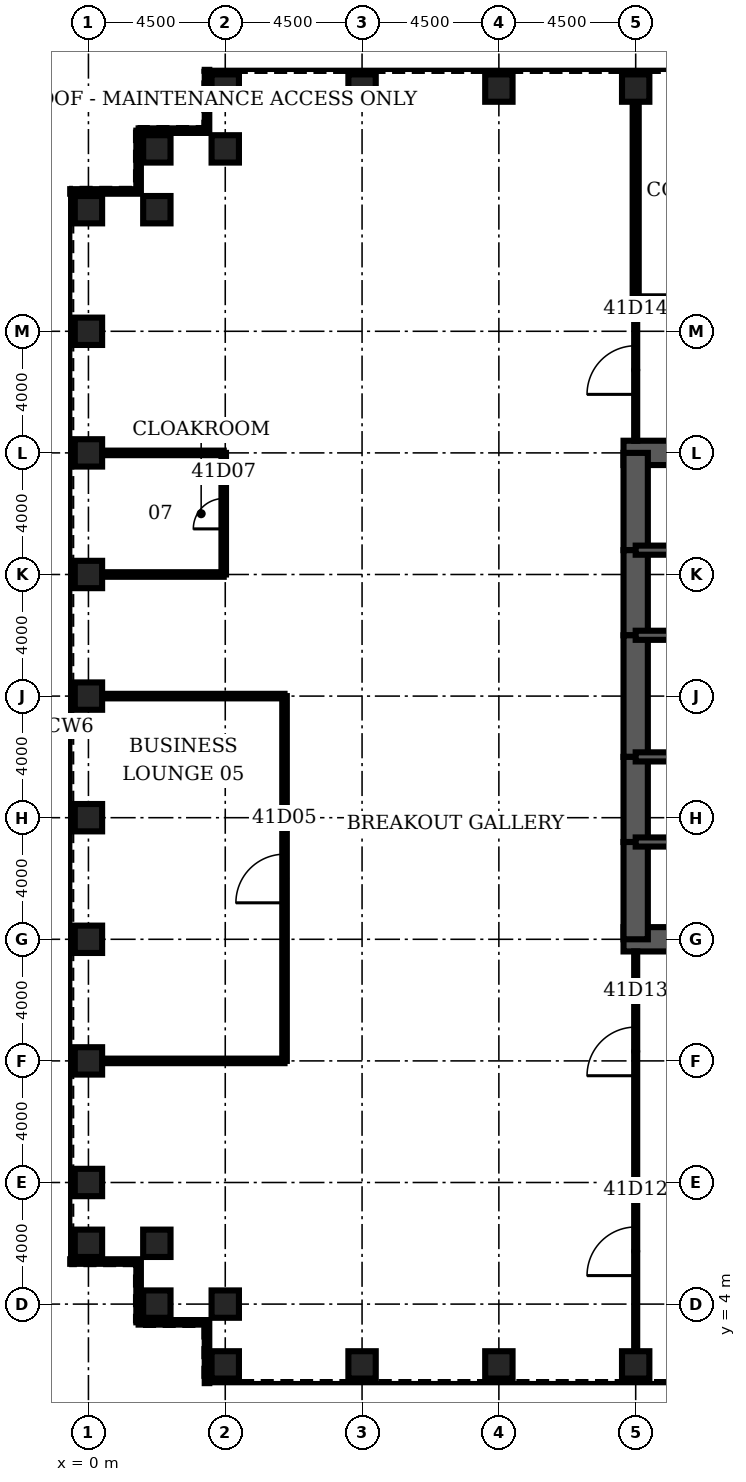
"""IFC4 building model, lengths in metres.
Left out: names, types, materials, properties, quantities, classifications, styles, units other than length and angle.
Written with IfcOpenShell. Run it as: python <this file> out.ifc"""

import sys

from ifc_helpers import new_model, si_unit, direction, frame, frame_2d, origin, origin_2d, place, context, subcontext, project, spatial, rectangle, hollow_rectangle, extrude, element, fill, save


model = new_model("IFC4")
c1 = context("Model", 3, precision=1e-05, world=origin(), true_north=direction((0.0, 1.0)))
c2 = subcontext(c1, "Body", "Model", "MODEL_VIEW")
j1 = project(units=[si_unit("LENGTHUNIT", "METRE"), si_unit("PLANEANGLEUNIT", "RADIAN")], contexts=[c1])
p1 = place(None, origin())
s1 = spatial("IfcSite", under=j1, at=p1, CompositionType="ELEMENT")
p2 = place(p1, origin())
s2 = spatial("IfcBuilding", under=s1, at=p2, CompositionType="ELEMENT")
p3 = place(p2, frame((0.0, 0.0, 185.8)))
s3 = spatial("IfcBuildingStorey", under=s2, at=p3, CompositionType="ELEMENT", Elevation=185.8)
for number, where, z_axis, x_axis in (
    (1, (4.5, 2.0, 0.0), (0.0, 0.0, 1.0), (0.0, 1.0, 0.0)),
    (2, (9.0, 2.0, 0.0), (0.0, 0.0, 1.0), (0.0, 1.0, 0.0)),
    (3, (13.5, 2.0, 0.0), (0.0, 0.0, 1.0), (0.0, 1.0, 0.0)),
    (4, (18.0, 2.0, 0.0), (0.0, 0.0, 1.0), (0.0, 1.0, 0.0)),
    (5, (18.0, 44.0, 0.0), (0.0, 0.0, 1.0), (0.0, 1.0, 0.0)),
    (6, (13.5, 44.0, 0.0), (0.0, 0.0, 1.0), (0.0, 1.0, 0.0)),
    (7, (9.0, 44.0, 0.0), (0.0, 0.0, 1.0), (0.0, 1.0, 0.0)),
    (8, (4.5, 44.0, 0.0), (0.0, 0.0, 1.0), (0.0, 1.0, 0.0)),
    (9, (4.5, 42.0, 0.0), (0.0, 0.0, 1.0), (0.0, 1.0, 0.0)),
    (10, (2.25, 42.0, 0.0), (0.0, 0.0, 1.0), (1.0, 0.0, 0.0)),
    (11, (2.25, 40.0, 0.0), (0.0, 0.0, 1.0), (1.0, 0.0, 0.0)),
    (12, (0.0, 40.0, 0.0), (0.0, 0.0, 1.0), (1.0, 0.0, 0.0)),
    (13, (0.0, 36.0, 0.0), (0.0, 0.0, 1.0), (1.0, 0.0, 0.0)),
    (14, (0.0, 32.0, 0.0), (0.0, 0.0, 1.0), (1.0, 0.0, 0.0)),
    (15, (0.0, 28.0, 0.0), (0.0, 0.0, 1.0), (1.0, 0.0, 0.0)),
    (16, (0.0, 24.0, 0.0), (0.0, 0.0, 1.0), (1.0, 0.0, 0.0)),
    (17, (0.0, 20.0, 0.0), (0.0, 0.0, 1.0), (1.0, 0.0, 0.0)),
    (18, (0.0, 16.0, 0.0), (0.0, 0.0, 1.0), (1.0, 0.0, 0.0)),
    (19, (0.0, 12.0, 0.0), (0.0, 0.0, 1.0), (1.0, 0.0, 0.0)),
    (20, (0.0, 8.0, 0.0), (0.0, 0.0, 1.0), (1.0, 0.0, 0.0)),
    (21, (0.0, 6.0, 0.0), (0.0, 0.0, 1.0), (1.0, 0.0, 0.0)),
    (22, (2.25, 6.0, 0.0), (0.0, 0.0, 1.0), (1.0, 0.0, 0.0)),
    (23, (2.25, 4.0, 0.0), (0.0, 0.0, 1.0), (1.0, 0.0, 0.0)),
    (24, (4.5, 4.0, 0.0), (0.0, 0.0, 1.0), (0.0, 1.0, 0.0)),
):
    element("IfcColumn", number, at=place(p3, frame(where, z_axis=z_axis, x_axis=x_axis)), inside=s3, PredefinedType="COLUMN", context=c2, shape_type="SweptSolid", body=[
        extrude(hollow_rectangle(XDim=0.9, YDim=0.9, WallThickness=0.09, at=origin_2d()), origin(), (0.0, 0.0, 1.0), 4.2),
    ])
for number, where, z_axis, x_axis in (
    (25, (17.6, 16.0, 0.0), (0.0, 0.0, 1.0), (1.0, 0.0, 0.0)),
    (26, (27.0, 32.0, 0.0), (0.0, 0.0, 1.0), (-1.0, 0.0, 0.0)),
):
    element("IfcWall", number, at=place(p3, frame(where, z_axis=z_axis, x_axis=x_axis)), inside=s3, PredefinedType="SHEAR", context=c2, shape_type="SweptSolid", body=[
        extrude(rectangle(XDim=9.4, YDim=0.8, at=frame_2d((4.7, 0.0))), origin(), (0.0, 0.0, 1.0), 4.2),
    ])
p4 = place(p3, frame((18.0, 32.0, 0.0), z_axis=(0.0, 0.0, 1.0), x_axis=(0.0, -1.0, 0.0)))
e27 = element("IfcWall", 27, at=p4, inside=s3, PredefinedType="SHEAR", context=c2, shape_type="SweptSolid", body=[
    extrude(rectangle(XDim=3.2, YDim=0.8, at=frame_2d((1.6, 0.0))), origin(), (0.0, 0.0, 1.0), 4.2),
])
p5 = place(p3, frame((18.0, 28.8, 0.0), z_axis=(0.0, 0.0, 1.0), x_axis=(0.0, -1.0, 0.0)))
e28 = element("IfcWall", 28, at=p5, inside=s3, PredefinedType="SHEAR", context=c2, shape_type="SweptSolid", body=[
    extrude(rectangle(XDim=2.8, YDim=0.8, at=frame_2d((1.4, 0.0))), origin(), (0.0, 0.0, 1.0), 4.2),
])
p6 = place(p5, frame((0.4, 0.0, 0.0)))
e29 = element("IfcOpeningElement", 29, at=p6, cuts=e28, PredefinedType="OPENING", context=c2, shape_type="SweptSolid", body=[
    extrude(rectangle(XDim=1.8, YDim=2.1, at=frame_2d((0.9, 1.05))), frame((0.0, 0.41, 0.0), z_axis=(0.0, -1.0, 0.0), x_axis=(1.0, 0.0, 0.0)), (0.0, 0.0, 1.0), 0.82),
])
p7 = place(p3, frame((18.0, 26.0, 0.0), z_axis=(0.0, 0.0, 1.0), x_axis=(0.0, -1.0, 0.0)))
e30 = element("IfcWall", 30, at=p7, inside=s3, PredefinedType="SHEAR", context=c2, shape_type="SweptSolid", body=[
    extrude(rectangle(XDim=4.0, YDim=0.8, at=frame_2d((2.0, 0.0))), origin(), (0.0, 0.0, 1.0), 4.2),
])
p8 = place(p3, frame((18.0, 22.0, 0.0), z_axis=(0.0, 0.0, 1.0), x_axis=(0.0, -1.0, 0.0)))
e31 = element("IfcWall", 31, at=p8, inside=s3, PredefinedType="SHEAR", context=c2, shape_type="SweptSolid", body=[
    extrude(rectangle(XDim=2.8, YDim=0.8, at=frame_2d((1.4, 0.0))), origin(), (0.0, 0.0, 1.0), 4.2),
])
p9 = place(p8, frame((0.6, 0.0, 0.0)))
e32 = element("IfcOpeningElement", 32, at=p9, cuts=e31, PredefinedType="OPENING", context=c2, shape_type="SweptSolid", body=[
    extrude(rectangle(XDim=1.8, YDim=2.1, at=frame_2d((0.9, 1.05))), frame((0.0, 0.41, 0.0), z_axis=(0.0, -1.0, 0.0), x_axis=(1.0, 0.0, 0.0)), (0.0, 0.0, 1.0), 0.82),
])
p10 = place(p3, frame((18.0, 19.2, 0.0), z_axis=(0.0, 0.0, 1.0), x_axis=(0.0, -1.0, 0.0)))
e33 = element("IfcWall", 33, at=p10, inside=s3, PredefinedType="SHEAR", context=c2, shape_type="SweptSolid", body=[
    extrude(rectangle(XDim=3.2, YDim=0.8, at=frame_2d((1.6, 0.0))), origin(), (0.0, 0.0, 1.0), 4.2),
])
p11 = place(p3, frame((18.0, 19.2, 0.0), z_axis=(0.0, 0.0, 1.0), x_axis=(1.0, 0.0, 0.0)))
e34 = element("IfcWall", 34, at=p11, inside=s3, PredefinedType="SOLIDWALL", context=c2, shape_type="SweptSolid", body=[
    extrude(rectangle(XDim=9.0, YDim=0.3, at=frame_2d((4.5, 0.0))), origin(), (0.0, 0.0, 1.0), 4.2),
])
p12 = place(p11, frame((0.65, 0.0, 0.0)))
e35 = element("IfcOpeningElement", 35, at=p12, cuts=e34, PredefinedType="OPENING", context=c2, shape_type="SweptSolid", body=[
    extrude(rectangle(XDim=1.0, YDim=2.1, at=frame_2d((0.5, 1.05))), frame((0.0, 0.16, 0.0), z_axis=(0.0, -1.0, 0.0), x_axis=(1.0, 0.0, 0.0)), (0.0, 0.0, 1.0), 0.32),
])
p13 = place(p3, frame((18.0, 28.8, 0.0), z_axis=(0.0, 0.0, 1.0), x_axis=(1.0, 0.0, 0.0)))
e36 = element("IfcWall", 36, at=p13, inside=s3, PredefinedType="SOLIDWALL", context=c2, shape_type="SweptSolid", body=[
    extrude(rectangle(XDim=9.0, YDim=0.3, at=frame_2d((4.5, 0.0))), origin(), (0.0, 0.0, 1.0), 4.2),
])
p14 = place(p13, frame((0.65, 0.0, 0.0)))
e37 = element("IfcOpeningElement", 37, at=p14, cuts=e36, PredefinedType="OPENING", context=c2, shape_type="SweptSolid", body=[
    extrude(rectangle(XDim=1.0, YDim=2.1, at=frame_2d((0.5, 1.05))), frame((0.0, 0.16, 0.0), z_axis=(0.0, -1.0, 0.0), x_axis=(1.0, 0.0, 0.0)), (0.0, 0.0, 1.0), 0.32),
])
p15 = place(p3, frame((18.0, 22.0, 0.0), z_axis=(0.0, 0.0, 1.0), x_axis=(1.0, 0.0, 0.0)))
e38 = element("IfcWall", 38, at=p15, inside=s3, PredefinedType="SOLIDWALL", context=c2, shape_type="SweptSolid", body=[
    extrude(rectangle(XDim=6.0, YDim=0.3, at=frame_2d((3.0, 0.0))), origin(), (0.0, 0.0, 1.0), 4.2),
])
p16 = place(p15, frame((2.0, 0.0, 0.0)))
e39 = element("IfcOpeningElement", 39, at=p16, cuts=e38, PredefinedType="OPENING", context=c2, shape_type="SweptSolid", body=[
    extrude(rectangle(XDim=1.0, YDim=2.1, at=frame_2d((0.5, 1.05))), frame((0.0, 0.16, 0.0), z_axis=(0.0, -1.0, 0.0), x_axis=(1.0, 0.0, 0.0)), (0.0, 0.0, 1.0), 0.32),
])
p17 = place(p3, frame((18.0, 26.0, 0.0), z_axis=(0.0, 0.0, 1.0), x_axis=(1.0, 0.0, 0.0)))
e40 = element("IfcWall", 40, at=p17, inside=s3, PredefinedType="SOLIDWALL", context=c2, shape_type="SweptSolid", body=[
    extrude(rectangle(XDim=6.0, YDim=0.3, at=frame_2d((3.0, 0.0))), origin(), (0.0, 0.0, 1.0), 4.2),
])
for number, where, z_axis, x_axis in (
    (41, (0.45, 12.0, 0.0), (0.0, 0.0, 1.0), (1.0, 0.0, 0.0)),
    (42, (0.45, 24.0, 0.0), (0.0, 0.0, 1.0), (1.0, 0.0, 0.0)),
):
    element("IfcWall", number, at=place(p3, frame(where, z_axis=z_axis, x_axis=x_axis)), inside=s3, PredefinedType="PARTITIONING", context=c2, shape_type="SweptSolid", body=[
        extrude(rectangle(XDim=6.0, YDim=0.15, at=frame_2d((3.0, 0.0))), origin(), (0.0, 0.0, 1.0), 3.0),
    ])
for number, where, z_axis, x_axis in (
    (43, (0.45, 28.0, 0.0), (0.0, 0.0, 1.0), (1.0, 0.0, 0.0)),
    (44, (0.45, 32.0, 0.0), (0.0, 0.0, 1.0), (1.0, 0.0, 0.0)),
):
    element("IfcWall", number, at=place(p3, frame(where, z_axis=z_axis, x_axis=x_axis)), inside=s3, PredefinedType="PARTITIONING", context=c2, shape_type="SweptSolid", body=[
        extrude(rectangle(XDim=4.0, YDim=0.15, at=frame_2d((2.0, 0.0))), origin(), (0.0, 0.0, 1.0), 3.0),
    ])
p18 = place(p3, frame((18.0, 37.05, 0.0), z_axis=(0.0, 0.0, 1.0), x_axis=(1.0, 0.0, 0.0)))
e45 = element("IfcWall", 45, at=p18, inside=s3, PredefinedType="PARTITIONING", context=c2, shape_type="SweptSolid", body=[
    extrude(rectangle(XDim=27.0, YDim=0.2, at=frame_2d((13.5, 0.0))), origin(), (0.0, 0.0, 1.0), 3.0),
])
p19 = place(p18, frame((3.7, 0.0, 0.0)))
e46 = element("IfcOpeningElement", 46, at=p19, cuts=e45, PredefinedType="OPENING", context=c2, shape_type="SweptSolid", body=[
    extrude(rectangle(XDim=1.6, YDim=2.1, at=frame_2d((0.8, 1.05))), frame((0.0, 0.11, 0.0), z_axis=(0.0, -1.0, 0.0), x_axis=(1.0, 0.0, 0.0)), (0.0, 0.0, 1.0), 0.22),
])
p20 = place(p18, frame((12.7, 0.0, 0.0)))
e47 = element("IfcOpeningElement", 47, at=p20, cuts=e45, PredefinedType="OPENING", context=c2, shape_type="SweptSolid", body=[
    extrude(rectangle(XDim=1.6, YDim=2.1, at=frame_2d((0.8, 1.05))), frame((0.0, 0.11, 0.0), z_axis=(0.0, -1.0, 0.0), x_axis=(1.0, 0.0, 0.0)), (0.0, 0.0, 1.0), 0.22),
])
p21 = place(p18, frame((21.7, 0.0, 0.0)))
e48 = element("IfcOpeningElement", 48, at=p21, cuts=e45, PredefinedType="OPENING", context=c2, shape_type="SweptSolid", body=[
    extrude(rectangle(XDim=1.6, YDim=2.1, at=frame_2d((0.8, 1.05))), frame((0.0, 0.11, 0.0), z_axis=(0.0, -1.0, 0.0), x_axis=(1.0, 0.0, 0.0)), (0.0, 0.0, 1.0), 0.22),
])
p22 = place(p3, frame((4.45, 28.0, 0.0), z_axis=(0.0, 0.0, 1.0), x_axis=(0.0, 1.0, 0.0)))
e49 = element("IfcWall", 49, at=p22, inside=s3, PredefinedType="PARTITIONING", context=c2, shape_type="SweptSolid", body=[
    extrude(rectangle(XDim=4.0, YDim=0.15, at=frame_2d((2.0, 0.0))), origin(), (0.0, 0.0, 1.0), 3.0),
])
p23 = place(p22, frame((1.5, 0.0, 0.0)))
e50 = element("IfcOpeningElement", 50, at=p23, cuts=e49, PredefinedType="OPENING", context=c2, shape_type="SweptSolid", body=[
    extrude(rectangle(XDim=1.0, YDim=2.1, at=frame_2d((0.5, 1.05))), frame((0.0, 0.085, 0.0), z_axis=(0.0, -1.0, 0.0), x_axis=(1.0, 0.0, 0.0)), (0.0, 0.0, 1.0), 0.17),
])
p24 = place(p3, frame((6.45, 12.0, 0.0), z_axis=(0.0, 0.0, 1.0), x_axis=(0.0, 1.0, 0.0)))
e51 = element("IfcWall", 51, at=p24, inside=s3, PredefinedType="PARTITIONING", context=c2, shape_type="SweptSolid", body=[
    extrude(rectangle(XDim=12.0, YDim=0.15, at=frame_2d((6.0, 0.0))), origin(), (0.0, 0.0, 1.0), 3.0),
])
p25 = place(p24, frame((5.2, 0.0, 0.0)))
e52 = element("IfcOpeningElement", 52, at=p25, cuts=e51, PredefinedType="OPENING", context=c2, shape_type="SweptSolid", body=[
    extrude(rectangle(XDim=1.6, YDim=2.1, at=frame_2d((0.8, 1.05))), frame((0.0, 0.085, 0.0), z_axis=(0.0, -1.0, 0.0), x_axis=(1.0, 0.0, 0.0)), (0.0, 0.0, 1.0), 0.17),
])
p26 = place(p3, frame((18.0, 2.45, 0.0), z_axis=(0.0, 0.0, 1.0), x_axis=(0.0, 1.0, 0.0)))
e53 = element("IfcWall", 53, at=p26, inside=s3, PredefinedType="PARTITIONING", context=c2, shape_type="SweptSolid", body=[
    extrude(rectangle(XDim=13.15, YDim=0.1, at=frame_2d((6.575, 0.0))), origin(), (0.0, 0.0, 1.0), 3.0),
])
p27 = place(p26, frame((2.488, 0.0, 0.0)))
e54 = element("IfcOpeningElement", 54, at=p27, cuts=e53, PredefinedType="OPENING", context=c2, shape_type="SweptSolid", body=[
    extrude(rectangle(XDim=1.6, YDim=2.1, at=frame_2d((0.8, 1.05))), frame((0.0, 0.06, 0.0), z_axis=(0.0, -1.0, 0.0), x_axis=(1.0, 0.0, 0.0)), (0.0, 0.0, 1.0), 0.12),
])
p28 = place(p26, frame((9.062, 0.0, 0.0)))
e55 = element("IfcOpeningElement", 55, at=p28, cuts=e53, PredefinedType="OPENING", context=c2, shape_type="SweptSolid", body=[
    extrude(rectangle(XDim=1.6, YDim=2.1, at=frame_2d((0.8, 1.05))), frame((0.0, 0.06, 0.0), z_axis=(0.0, -1.0, 0.0), x_axis=(1.0, 0.0, 0.0)), (0.0, 0.0, 1.0), 0.12),
])
p29 = place(p3, frame((18.0, 32.4, 0.0), z_axis=(0.0, 0.0, 1.0), x_axis=(0.0, 1.0, 0.0)))
e56 = element("IfcWall", 56, at=p29, inside=s3, PredefinedType="PARTITIONING", context=c2, shape_type="SweptSolid", body=[
    extrude(rectangle(XDim=4.65, YDim=0.1, at=frame_2d((2.325, 0.0))), origin(), (0.0, 0.0, 1.0), 3.0),
])
p30 = place(p29, frame((1.525, 0.0, 0.0)))
e57 = element("IfcOpeningElement", 57, at=p30, cuts=e56, PredefinedType="OPENING", context=c2, shape_type="SweptSolid", body=[
    extrude(rectangle(XDim=1.6, YDim=2.1, at=frame_2d((0.8, 1.05))), frame((0.0, 0.06, 0.0), z_axis=(0.0, -1.0, 0.0), x_axis=(1.0, 0.0, 0.0)), (0.0, 0.0, 1.0), 0.12),
])
p31 = place(p3, frame((18.0, 37.05, 0.0), z_axis=(0.0, 0.0, 1.0), x_axis=(0.0, 1.0, 0.0)))
e58 = element("IfcWall", 58, at=p31, inside=s3, PredefinedType="PARTITIONING", context=c2, shape_type="SweptSolid", body=[
    extrude(rectangle(XDim=6.5, YDim=0.2, at=frame_2d((3.25, 0.0))), origin(), (0.0, 0.0, 1.0), 3.0),
])
p32 = place(p3, frame((3.9, 44.6, 0.0), z_axis=(0.0, 0.0, 1.0), x_axis=(0.0, -1.0, 0.0)))
e59 = element("IfcWall", 59, at=p32, inside=s3, PredefinedType="ELEMENTEDWALL", context=c2, shape_type="SweptSolid", body=[
    extrude(rectangle(XDim=2.0, YDim=0.15, at=frame_2d((1.0, 0.0))), origin(), (0.0, 0.0, 1.0), 4.04),
])
p33 = place(p3, frame((3.9, 42.6, 0.0), z_axis=(0.0, 0.0, 1.0), x_axis=(-1.0, 0.0, 0.0)))
e60 = element("IfcWall", 60, at=p33, inside=s3, PredefinedType="ELEMENTEDWALL", context=c2, shape_type="SweptSolid", body=[
    extrude(rectangle(XDim=2.25, YDim=0.15, at=frame_2d((1.125, 0.0))), origin(), (0.0, 0.0, 1.0), 4.04),
])
p34 = place(p3, frame((1.65, 42.6, 0.0), z_axis=(0.0, 0.0, 1.0), x_axis=(0.0, -1.0, 0.0)))
e61 = element("IfcWall", 61, at=p34, inside=s3, PredefinedType="ELEMENTEDWALL", context=c2, shape_type="SweptSolid", body=[
    extrude(rectangle(XDim=2.0, YDim=0.15, at=frame_2d((1.0, 0.0))), origin(), (0.0, 0.0, 1.0), 4.04),
])
for number, where, z_axis, x_axis in (
    (62, (1.65, 40.6, 0.0), (0.0, 0.0, 1.0), (-1.0, 0.0, 0.0)),
    (63, (-0.6, 5.4, 0.0), (0.0, 0.0, 1.0), (1.0, 0.0, 0.0)),
):
    element("IfcWall", number, at=place(p3, frame(where, z_axis=z_axis, x_axis=x_axis)), inside=s3, PredefinedType="ELEMENTEDWALL", context=c2, shape_type="SweptSolid", body=[
        extrude(rectangle(XDim=2.25, YDim=0.15, at=frame_2d((1.125, 0.0))), origin(), (0.0, 0.0, 1.0), 4.04),
    ])
p35 = place(p3, frame((1.65, 5.4, 0.0), z_axis=(0.0, 0.0, 1.0), x_axis=(0.0, -1.0, 0.0)))
e64 = element("IfcWall", 64, at=p35, inside=s3, PredefinedType="ELEMENTEDWALL", context=c2, shape_type="SweptSolid", body=[
    extrude(rectangle(XDim=2.0, YDim=0.15, at=frame_2d((1.0, 0.0))), origin(), (0.0, 0.0, 1.0), 4.04),
])
p36 = place(p3, frame((1.65, 3.4, 0.0), z_axis=(0.0, 0.0, 1.0), x_axis=(1.0, 0.0, 0.0)))
e65 = element("IfcWall", 65, at=p36, inside=s3, PredefinedType="ELEMENTEDWALL", context=c2, shape_type="SweptSolid", body=[
    extrude(rectangle(XDim=2.25, YDim=0.15, at=frame_2d((1.125, 0.0))), origin(), (0.0, 0.0, 1.0), 4.04),
])
p37 = place(p3, frame((3.9, 3.4, 0.0), z_axis=(0.0, 0.0, 1.0), x_axis=(0.0, -1.0, 0.0)))
e66 = element("IfcWall", 66, at=p37, inside=s3, PredefinedType="ELEMENTEDWALL", context=c2, shape_type="SweptSolid", body=[
    extrude(rectangle(XDim=2.0, YDim=0.15, at=frame_2d((1.0, 0.0))), origin(), (0.0, 0.0, 1.0), 4.04),
])
p38 = place(p25, origin())
e67 = element("IfcDoor", 67, at=p38, inside=s3, OperationType="SINGLE_SWING_LEFT", PredefinedType="DOOR", context=c2, shape_type="SweptSolid", body=[
    extrude(rectangle(XDim=1.6, YDim=2.1, at=frame_2d((0.8, 1.05))), frame((0.0, 0.025, 0.0), z_axis=(0.0, -1.0, 0.0), x_axis=(1.0, 0.0, 0.0)), (0.0, 0.0, 1.0), 0.05),
])
fill(e52, e67)
p39 = place(p23, origin())
e68 = element("IfcDoor", 68, at=p39, inside=s3, OperationType="SINGLE_SWING_LEFT", PredefinedType="DOOR", context=c2, shape_type="SweptSolid", body=[
    extrude(rectangle(XDim=1.0, YDim=2.1, at=frame_2d((0.5, 1.05))), frame((0.0, 0.025, 0.0), z_axis=(0.0, -1.0, 0.0), x_axis=(1.0, 0.0, 0.0)), (0.0, 0.0, 1.0), 0.05),
])
fill(e50, e68)
p40 = place(p27, origin())
e69 = element("IfcDoor", 69, at=p40, inside=s3, OperationType="SINGLE_SWING_LEFT", PredefinedType="DOOR", context=c2, shape_type="SweptSolid", body=[
    extrude(rectangle(XDim=1.6, YDim=2.1, at=frame_2d((0.8, 1.05))), frame((0.0, 0.025, 0.0), z_axis=(0.0, -1.0, 0.0), x_axis=(1.0, 0.0, 0.0)), (0.0, 0.0, 1.0), 0.05),
])
fill(e54, e69)
p41 = place(p28, origin())
e70 = element("IfcDoor", 70, at=p41, inside=s3, OperationType="SINGLE_SWING_LEFT", PredefinedType="DOOR", context=c2, shape_type="SweptSolid", body=[
    extrude(rectangle(XDim=1.6, YDim=2.1, at=frame_2d((0.8, 1.05))), frame((0.0, 0.025, 0.0), z_axis=(0.0, -1.0, 0.0), x_axis=(1.0, 0.0, 0.0)), (0.0, 0.0, 1.0), 0.05),
])
fill(e55, e70)
p42 = place(p30, origin())
e71 = element("IfcDoor", 71, at=p42, inside=s3, OperationType="SINGLE_SWING_LEFT", PredefinedType="DOOR", context=c2, shape_type="SweptSolid", body=[
    extrude(rectangle(XDim=1.6, YDim=2.1, at=frame_2d((0.8, 1.05))), frame((0.0, 0.025, 0.0), z_axis=(0.0, -1.0, 0.0), x_axis=(1.0, 0.0, 0.0)), (0.0, 0.0, 1.0), 0.05),
])
fill(e57, e71)
p43 = place(p12, origin())
e72 = element("IfcDoor", 72, at=p43, inside=s3, OperationType="SINGLE_SWING_LEFT", PredefinedType="DOOR", context=c2, shape_type="SweptSolid", body=[
    extrude(rectangle(XDim=1.0, YDim=2.1, at=frame_2d((0.5, 1.05))), frame((0.0, 0.025, 0.0), z_axis=(0.0, -1.0, 0.0), x_axis=(1.0, 0.0, 0.0)), (0.0, 0.0, 1.0), 0.05),
])
fill(e35, e72)
p44 = place(p14, origin())
e73 = element("IfcDoor", 73, at=p44, inside=s3, OperationType="SINGLE_SWING_LEFT", PredefinedType="DOOR", context=c2, shape_type="SweptSolid", body=[
    extrude(rectangle(XDim=1.0, YDim=2.1, at=frame_2d((0.5, 1.05))), frame((0.0, 0.025, 0.0), z_axis=(0.0, -1.0, 0.0), x_axis=(1.0, 0.0, 0.0)), (0.0, 0.0, 1.0), 0.05),
])
fill(e37, e73)
p45 = place(p9, origin())
e74 = element("IfcDoor", 74, at=p45, inside=s3, OperationType="SINGLE_SWING_LEFT", PredefinedType="DOOR", context=c2, shape_type="SweptSolid", body=[
    extrude(rectangle(XDim=1.8, YDim=2.1, at=frame_2d((0.9, 1.05))), frame((0.0, 0.4, 0.0), z_axis=(0.0, -1.0, 0.0), x_axis=(1.0, 0.0, 0.0)), (0.0, 0.0, 1.0), 0.8),
])
fill(e32, e74)
p46 = place(p6, origin())
e75 = element("IfcDoor", 75, at=p46, inside=s3, OperationType="SINGLE_SWING_LEFT", PredefinedType="DOOR", context=c2, shape_type="SweptSolid", body=[
    extrude(rectangle(XDim=1.8, YDim=2.1, at=frame_2d((0.9, 1.05))), frame((0.0, 0.4, 0.0), z_axis=(0.0, -1.0, 0.0), x_axis=(1.0, 0.0, 0.0)), (0.0, 0.0, 1.0), 0.8),
])
fill(e29, e75)
save(model, sys.argv[1])
